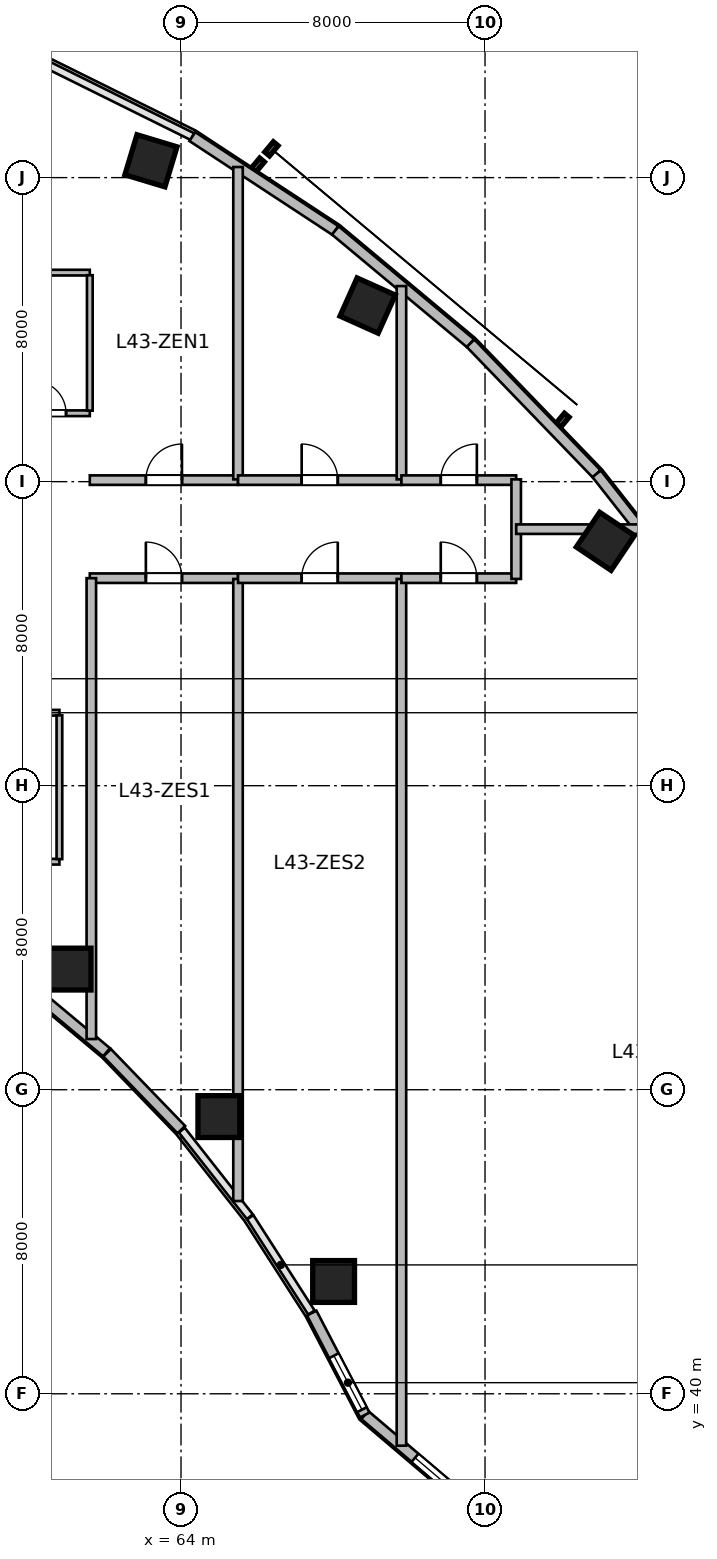
"""IFC4 building model, lengths in metres.
Left out: names, types, materials, properties, quantities, classifications, styles, units other than length and angle.
Written with IfcOpenShell. Run it as: python <this file> out.ifc"""

import sys

from ifc_helpers import new_model, si_unit, direction, frame, frame_2d, origin, origin_2d, place, context, subcontext, project, spatial, rectangle, circle, extrude, source, transform, mapped, element, fill, save


model = new_model("IFC4")
c1 = context("Model", 3, precision=1e-05, world=origin(), true_north=direction((0.0, 1.0)))
c2 = subcontext(c1, "Body", "Model", "MODEL_VIEW")
j1 = project(units=[si_unit("LENGTHUNIT", "METRE"), si_unit("PLANEANGLEUNIT", "RADIAN")], contexts=[c1])
p1 = place(None, origin())
s1 = spatial("IfcSite", under=j1, at=p1, CompositionType="ELEMENT")
p2 = place(p1, origin())
s2 = spatial("IfcBuilding", under=s1, at=p2, CompositionType="ELEMENT")
p3 = place(p2, frame((0.0, 0.0, 177.9)))
s3 = spatial("IfcBuildingStorey", under=s2, at=p3, CompositionType="ELEMENT", Elevation=177.9)
m1 = source(origin(), c2, "Body", "SweptSolid", [
    extrude(rectangle(XDim=1.1, YDim=1.1, at=origin_2d()), origin(), (0.0, 0.0, 1.0), 3.9),
])
p4 = place(p3, frame((63.209, 72.442, 0.0), z_axis=(0.0, 0.0, 1.0), x_axis=(0.288697611798, 0.957420330337, 0.0)))
e1 = element("IfcColumn", 1, at=p4, inside=s3, PredefinedType="COLUMN", context=c2, shape_type="MappedRepresentation", body=[
    mapped(m1, transform((0.0, 0.0, 0.0), scale=1.0)),
])
m2 = source(origin(), c2, "Body", "SweptSolid", [
    extrude(circle(Radius=0.55, at=origin_2d()), origin(), (0.0, 0.0, 1.0), 3.9),
])
p5 = place(p3, frame((61.082, 51.175, 0.0), z_axis=(0.0, 0.0, 1.0), x_axis=(0.409126902895, 0.912477494148, 0.0)))
e2 = element("IfcColumn", 2, at=p5, inside=s3, PredefinedType="COLUMN", context=c2, shape_type="MappedRepresentation", body=[
    mapped(m2, transform((0.0, 0.0, 0.0), scale=1.0)),
])
p6 = place(p3, frame((68.91, 68.633, 0.0), z_axis=(0.0, 0.0, 1.0), x_axis=(0.409126902895, 0.912477494148, 0.0)))
e3 = element("IfcColumn", 3, at=p6, inside=s3, PredefinedType="COLUMN", context=c2, shape_type="MappedRepresentation", body=[
    mapped(m1, transform((0.0, 0.0, 0.0), scale=1.0)),
])
p7 = place(p3, frame((64.996, 47.294, 0.0), z_axis=(0.0, 0.0, 1.0), x_axis=(0.55774510898, 0.830012285095, 0.0)))
e4 = element("IfcColumn", 4, at=p7, inside=s3, PredefinedType="COLUMN", context=c2, shape_type="MappedRepresentation", body=[
    mapped(m2, transform((0.0, 0.0, 0.0), scale=1.0)),
])
p8 = place(p3, frame((75.167, 62.43, 0.0), z_axis=(0.0, 0.0, 1.0), x_axis=(0.55774510898, 0.830012285095, 0.0)))
e5 = element("IfcColumn", 5, at=p8, inside=s3, PredefinedType="COLUMN", context=c2, shape_type="MappedRepresentation", body=[
    mapped(m1, transform((0.0, 0.0, 0.0), scale=1.0)),
])
p9 = place(p3, frame((68.015, 42.955, 0.0), z_axis=(0.0, 0.0, 1.0), x_axis=(0.690756218984, 0.723087716626, 0.0)))
e6 = element("IfcColumn", 6, at=p9, inside=s3, PredefinedType="COLUMN", context=c2, shape_type="MappedRepresentation", body=[
    mapped(m2, transform((0.0, 0.0, 0.0), scale=1.0)),
])
m3 = source(origin(), c2, "Body", "SweptSolid", [
    extrude(rectangle(XDim=4.096, YDim=0.28, at=frame_2d((2.048, 0.0))), origin(), (0.0, 0.0, 1.0), 3.65),
])
p10 = place(p3, frame((71.957, 36.788, 0.0), z_axis=(0.0, 0.0, 1.0), x_axis=(-0.761926081737, 0.647663991564, 0.0)))
e7 = element("IfcWall", 7, at=p10, inside=s3, PredefinedType="SOLIDWALL", context=c2, shape_type="MappedRepresentation", body=[
    mapped(m3, transform((0.0, 0.0, 0.0), scale=1.0)),
])
p11 = place(p10, frame((0.16, 0.0, 0.95)))
e8 = element("IfcOpeningElement", 8, at=p11, cuts=e7, PredefinedType="OPENING", context=c2, shape_type="SweptSolid", body=[
    extrude(rectangle(XDim=2.2, YDim=2.1, at=frame_2d((1.1, 1.05))), frame((0.0, 0.15, 0.0), z_axis=(0.0, -1.0, 0.0), x_axis=(1.0, 0.0, 0.0)), (0.0, 0.0, 1.0), 0.3),
])
m4 = source(origin(), c2, "Body", "SweptSolid", [
    extrude(rectangle(XDim=3.024, YDim=0.28, at=frame_2d((1.512, 0.0))), origin(), (0.0, 0.0, 1.0), 3.65),
])
p12 = place(p3, frame((68.836, 39.44, 0.0), z_axis=(0.0, 0.0, 1.0), x_axis=(-0.461718746531, 0.887026380161, 0.0)))
e9 = element("IfcWall", 9, at=p12, inside=s3, PredefinedType="SOLIDWALL", context=c2, shape_type="MappedRepresentation", body=[
    mapped(m4, transform((0.0, 0.0, 0.0), scale=1.0)),
])
p13 = place(p12, frame((0.16, 0.0, 0.95)))
e10 = element("IfcOpeningElement", 10, at=p13, cuts=e9, PredefinedType="OPENING", context=c2, shape_type="SweptSolid", body=[
    extrude(rectangle(XDim=1.6, YDim=1.9, at=frame_2d((0.8, 0.95))), frame((0.0, 0.15, 0.0), z_axis=(0.0, -1.0, 0.0), x_axis=(1.0, 0.0, 0.0)), (0.0, 0.0, 1.0), 0.3),
])
m5 = source(origin(), c2, "Body", "SweptSolid", [
    extrude(rectangle(XDim=2.812, YDim=0.28, at=frame_2d((1.406, 0.0))), origin(), (0.0, 0.0, 1.0), 3.65),
])
p14 = place(p3, frame((64.008, 46.95, 0.0), z_axis=(0.0, 0.0, 1.0), x_axis=(-0.694583668785, 0.719411931411, 0.0)))
e11 = element("IfcWall", 11, at=p14, inside=s3, PredefinedType="SOLIDWALL", context=c2, shape_type="MappedRepresentation", body=[
    mapped(m5, transform((0.0, 0.0, 0.0), scale=1.0)),
])
m6 = source(origin(), c2, "Body", "SweptSolid", [
    extrude(rectangle(XDim=2.729, YDim=0.28, at=frame_2d((1.365, 0.0))), origin(), (0.0, 0.0, 1.0), 3.65),
])
p15 = place(p3, frame((62.041, 48.987, 0.0), z_axis=(0.0, 0.0, 1.0), x_axis=(-0.767957284255, 0.640501061326, 0.0)))
e12 = element("IfcWall", 12, at=p15, inside=s3, PredefinedType="SOLIDWALL", context=c2, shape_type="MappedRepresentation", body=[
    mapped(m6, transform((0.0, 0.0, 0.0), scale=1.0)),
])
m7 = source(origin(), c2, "Body", "SweptSolid", [
    extrude(rectangle(XDim=4.501, YDim=0.28, at=frame_2d((2.25, 0.0))), origin(), (0.0, 0.0, 1.0), 3.65),
])
p16 = place(p3, frame((64.298, 73.08, 0.0), z_axis=(0.0, 0.0, 1.0), x_axis=(0.835984920737, -0.548752414391, 0.0)))
e13 = element("IfcWall", 13, at=p16, inside=s3, PredefinedType="SOLIDWALL", context=c2, shape_type="MappedRepresentation", body=[
    mapped(m7, transform((0.0, 0.0, 0.0), scale=1.0)),
])
m8 = source(origin(), c2, "Body", "SweptSolid", [
    extrude(rectangle(XDim=4.634, YDim=0.28, at=frame_2d((2.317, 0.0))), origin(), (0.0, 0.0, 1.0), 3.65),
])
p17 = place(p3, frame((68.061, 70.61, 0.0), z_axis=(0.0, 0.0, 1.0), x_axis=(0.767910229096, -0.640557475993, 0.0)))
e14 = element("IfcWall", 14, at=p17, inside=s3, PredefinedType="SOLIDWALL", context=c2, shape_type="MappedRepresentation", body=[
    mapped(m8, transform((0.0, 0.0, 0.0), scale=1.0)),
])
m9 = source(origin(), c2, "Body", "SweptSolid", [
    extrude(rectangle(XDim=4.776, YDim=0.28, at=frame_2d((2.388, 0.0))), origin(), (0.0, 0.0, 1.0), 3.65),
])
p18 = place(p3, frame((71.619, 67.642, 0.0), z_axis=(0.0, 0.0, 1.0), x_axis=(0.694601811851, -0.719394414055, 0.0)))
e15 = element("IfcWall", 15, at=p18, inside=s3, PredefinedType="SOLIDWALL", context=c2, shape_type="MappedRepresentation", body=[
    mapped(m9, transform((0.0, 0.0, 0.0), scale=1.0)),
])
m10 = source(origin(), c2, "Body", "SweptSolid", [
    extrude(rectangle(XDim=4.922, YDim=0.28, at=frame_2d((2.461, 0.0))), origin(), (0.0, 0.0, 1.0), 3.65),
])
p19 = place(p3, frame((74.936, 64.206, 0.0), z_axis=(0.0, 0.0, 1.0), x_axis=(0.61817639101, -0.786039407153, 0.0)))
e16 = element("IfcWall", 16, at=p19, inside=s3, PredefinedType="SOLIDWALL", context=c2, shape_type="MappedRepresentation", body=[
    mapped(m10, transform((0.0, 0.0, 0.0), scale=1.0)),
])
m11 = source(origin(), c2, "Body", "SweptSolid", [
    extrude(rectangle(XDim=2.1, YDim=0.15, at=frame_2d((1.05, 0.0))), origin(), (0.0, 0.0, 1.0), 3.65),
])
p20 = place(p3, frame((59.5, 65.8, 0.0), z_axis=(0.0, 0.0, 1.0), x_axis=(1.0, 0.0, 0.0)))
e17 = element("IfcWall", 17, at=p20, inside=s3, PredefinedType="PARTITIONING", context=c2, shape_type="MappedRepresentation", body=[
    mapped(m11, transform((0.0, 0.0, 0.0), scale=1.0)),
])
p21 = place(p20, frame((0.625, 0.0, 0.0)))
e18 = element("IfcOpeningElement", 18, at=p21, cuts=e17, PredefinedType="OPENING", context=c2, shape_type="SweptSolid", body=[
    extrude(rectangle(XDim=0.85, YDim=2.1, at=frame_2d((0.425, 1.05))), frame((0.0, 0.085, 0.0), z_axis=(0.0, -1.0, 0.0), x_axis=(1.0, 0.0, 0.0)), (0.0, 0.0, 1.0), 0.17),
])
p22 = place(p3, frame((59.5, 69.5, 0.0), z_axis=(0.0, 0.0, 1.0), x_axis=(1.0, 0.0, 0.0)))
e19 = element("IfcWall", 19, at=p22, inside=s3, PredefinedType="PARTITIONING", context=c2, shape_type="MappedRepresentation", body=[
    mapped(m11, transform((0.0, 0.0, 0.0), scale=1.0)),
])
m12 = source(origin(), c2, "Body", "SweptSolid", [
    extrude(rectangle(XDim=3.565, YDim=0.15, at=frame_2d((1.783, 0.0))), origin(), (0.0, 0.0, 1.0), 3.65),
])
p23 = place(p3, frame((61.6, 65.867, 0.0), z_axis=(0.0, 0.0, 1.0), x_axis=(0.0, 1.0, 0.0)))
e20 = element("IfcWall", 20, at=p23, inside=s3, PredefinedType="PARTITIONING", context=c2, shape_type="MappedRepresentation", body=[
    mapped(m12, transform((0.0, 0.0, 0.0), scale=1.0)),
])
m13 = source(origin(), c2, "Body", "SweptSolid", [
    extrude(rectangle(XDim=6.6, YDim=0.15, at=frame_2d((3.3, 0.0))), origin(), (0.0, 0.0, 1.0), 3.095),
])
p24 = place(p3, frame((54.2, 54.0, 0.0), z_axis=(0.0, 0.0, 1.0), x_axis=(1.0, 0.0, 0.0)))
e21 = element("IfcWall", 21, at=p24, inside=s3, PredefinedType="PARTITIONING", context=c2, shape_type="MappedRepresentation", body=[
    mapped(m13, transform((0.0, 0.0, 0.0), scale=1.0)),
])
m14 = source(origin(), c2, "Body", "SweptSolid", [
    extrude(rectangle(XDim=6.6, YDim=0.15, at=frame_2d((3.3, 0.0))), origin(), (0.0, 0.0, 1.0), 3.65),
])
p25 = place(p3, frame((54.2, 57.92, 0.0), z_axis=(0.0, 0.0, 1.0), x_axis=(1.0, 0.0, 0.0)))
e22 = element("IfcWall", 22, at=p25, inside=s3, PredefinedType="PARTITIONING", context=c2, shape_type="MappedRepresentation", body=[
    mapped(m14, transform((0.0, 0.0, 0.0), scale=1.0)),
])
p26 = place(p25, frame((2.825, 0.0, 0.0)))
e23 = element("IfcOpeningElement", 23, at=p26, cuts=e22, PredefinedType="OPENING", context=c2, shape_type="SweptSolid", body=[
    extrude(rectangle(XDim=0.95, YDim=2.1, at=frame_2d((0.475, 1.05))), frame((0.0, 0.085, 0.0), z_axis=(0.0, -1.0, 0.0), x_axis=(1.0, 0.0, 0.0)), (0.0, 0.0, 1.0), 0.17),
])
m15 = source(origin(), c2, "Body", "SweptSolid", [
    extrude(rectangle(XDim=3.785, YDim=0.15, at=frame_2d((1.893, 0.0))), origin(), (0.0, 0.0, 1.0), 3.65),
])
p27 = place(p3, frame((60.8, 54.067, 0.0), z_axis=(0.0, 0.0, 1.0), x_axis=(0.0, 1.0, 0.0)))
e24 = element("IfcWall", 24, at=p27, inside=s3, PredefinedType="PARTITIONING", context=c2, shape_type="MappedRepresentation", body=[
    mapped(m15, transform((0.0, 0.0, 0.0), scale=1.0)),
])
m16 = source(origin(), c2, "Body", "SweptSolid", [
    extrude(rectangle(XDim=3.9, YDim=0.25, at=frame_2d((1.95, 0.0))), origin(), (0.0, 0.0, 1.0), 3.65),
])
p28 = place(p3, frame((61.6, 64.04, 0.0), z_axis=(0.0, 0.0, 1.0), x_axis=(1.0, 0.0, 0.0)))
e25 = element("IfcWall", 25, at=p28, inside=s3, PredefinedType="PARTITIONING", context=c2, shape_type="MappedRepresentation", body=[
    mapped(m16, transform((0.0, 0.0, 0.0), scale=1.0)),
])
p29 = place(p28, frame((1.475, 0.0, 0.0)))
e26 = element("IfcOpeningElement", 26, at=p29, cuts=e25, PredefinedType="OPENING", context=c2, shape_type="SweptSolid", body=[
    extrude(rectangle(XDim=0.95, YDim=2.1, at=frame_2d((0.475, 1.05))), frame((0.0, 0.135, 0.0), z_axis=(0.0, -1.0, 0.0), x_axis=(1.0, 0.0, 0.0)), (0.0, 0.0, 1.0), 0.27),
])
m17 = source(origin(), c2, "Body", "SweptSolid", [
    extrude(rectangle(XDim=8.219, YDim=0.25, at=frame_2d((4.109, 0.0))), origin(), (0.0, 0.0, 1.0), 3.65),
])
p30 = place(p3, frame((65.5, 64.06, 0.0), z_axis=(0.0, 0.0, 1.0), x_axis=(0.0, 1.0, 0.0)))
e27 = element("IfcWall", 27, at=p30, inside=s3, PredefinedType="PARTITIONING", context=c2, shape_type="MappedRepresentation", body=[
    mapped(m17, transform((0.0, 0.0, 0.0), scale=1.0)),
])
m18 = source(origin(), c2, "Body", "SweptSolid", [
    extrude(rectangle(XDim=4.3, YDim=0.25, at=frame_2d((2.15, 0.0))), origin(), (0.0, 0.0, 1.0), 3.65),
])
p31 = place(p3, frame((65.5, 64.04, 0.0), z_axis=(0.0, 0.0, 1.0), x_axis=(1.0, 0.0, 0.0)))
e28 = element("IfcWall", 28, at=p31, inside=s3, PredefinedType="PARTITIONING", context=c2, shape_type="MappedRepresentation", body=[
    mapped(m18, transform((0.0, 0.0, 0.0), scale=1.0)),
])
p32 = place(p31, frame((1.675, 0.0, 0.0)))
e29 = element("IfcOpeningElement", 29, at=p32, cuts=e28, PredefinedType="OPENING", context=c2, shape_type="SweptSolid", body=[
    extrude(rectangle(XDim=0.95, YDim=2.1, at=frame_2d((0.475, 1.05))), frame((0.0, 0.135, 0.0), z_axis=(0.0, -1.0, 0.0), x_axis=(1.0, 0.0, 0.0)), (0.0, 0.0, 1.0), 0.27),
])
m19 = source(origin(), c2, "Body", "SweptSolid", [
    extrude(rectangle(XDim=5.086, YDim=0.25, at=frame_2d((2.543, 0.0))), origin(), (0.0, 0.0, 1.0), 3.65),
])
p33 = place(p3, frame((69.8, 64.06, 0.0), z_axis=(0.0, 0.0, 1.0), x_axis=(0.0, 1.0, 0.0)))
e30 = element("IfcWall", 30, at=p33, inside=s3, PredefinedType="PARTITIONING", context=c2, shape_type="MappedRepresentation", body=[
    mapped(m19, transform((0.0, 0.0, 0.0), scale=1.0)),
])
m20 = source(origin(), c2, "Body", "SweptSolid", [
    extrude(rectangle(XDim=3.02, YDim=0.25, at=frame_2d((1.51, 0.0))), origin(), (0.0, 0.0, 1.0), 3.65),
])
p34 = place(p3, frame((69.8, 64.04, 0.0), z_axis=(0.0, 0.0, 1.0), x_axis=(1.0, 0.0, 0.0)))
e31 = element("IfcWall", 31, at=p34, inside=s3, PredefinedType="PARTITIONING", context=c2, shape_type="MappedRepresentation", body=[
    mapped(m20, transform((0.0, 0.0, 0.0), scale=1.0)),
])
p35 = place(p34, frame((1.035, 0.0, 0.0)))
e32 = element("IfcOpeningElement", 32, at=p35, cuts=e31, PredefinedType="OPENING", context=c2, shape_type="SweptSolid", body=[
    extrude(rectangle(XDim=0.95, YDim=2.1, at=frame_2d((0.475, 1.05))), frame((0.0, 0.135, 0.0), z_axis=(0.0, -1.0, 0.0), x_axis=(1.0, 0.0, 0.0)), (0.0, 0.0, 1.0), 0.27),
])
p36 = place(p3, frame((61.6, 61.46, 0.0), z_axis=(0.0, 0.0, 1.0), x_axis=(1.0, 0.0, 0.0)))
e33 = element("IfcWall", 33, at=p36, inside=s3, PredefinedType="PARTITIONING", context=c2, shape_type="MappedRepresentation", body=[
    mapped(m16, transform((0.0, 0.0, 0.0), scale=1.0)),
])
p37 = place(p36, frame((1.475, 0.0, 0.0)))
e34 = element("IfcOpeningElement", 34, at=p37, cuts=e33, PredefinedType="OPENING", context=c2, shape_type="SweptSolid", body=[
    extrude(rectangle(XDim=0.95, YDim=2.1, at=frame_2d((0.475, 1.05))), frame((0.0, 0.135, 0.0), z_axis=(0.0, -1.0, 0.0), x_axis=(1.0, 0.0, 0.0)), (0.0, 0.0, 1.0), 0.27),
])
m21 = source(origin(), c2, "Body", "SweptSolid", [
    extrude(rectangle(XDim=16.369, YDim=0.25, at=frame_2d((8.185, 0.0))), origin(), (0.0, 0.0, 1.0), 2.942),
])
p38 = place(p3, frame((65.5, 45.071, 0.0), z_axis=(0.0, 0.0, 1.0), x_axis=(0.0, 1.0, 0.0)))
e35 = element("IfcWall", 35, at=p38, inside=s3, PredefinedType="PARTITIONING", context=c2, shape_type="MappedRepresentation", body=[
    mapped(m21, transform((0.0, 0.0, 0.0), scale=1.0)),
])
p39 = place(p3, frame((65.5, 61.46, 0.0), z_axis=(0.0, 0.0, 1.0), x_axis=(1.0, 0.0, 0.0)))
e36 = element("IfcWall", 36, at=p39, inside=s3, PredefinedType="PARTITIONING", context=c2, shape_type="MappedRepresentation", body=[
    mapped(m18, transform((0.0, 0.0, 0.0), scale=1.0)),
])
p40 = place(p39, frame((1.675, 0.0, 0.0)))
e37 = element("IfcOpeningElement", 37, at=p40, cuts=e36, PredefinedType="OPENING", context=c2, shape_type="SweptSolid", body=[
    extrude(rectangle(XDim=0.95, YDim=2.1, at=frame_2d((0.475, 1.05))), frame((0.0, 0.135, 0.0), z_axis=(0.0, -1.0, 0.0), x_axis=(1.0, 0.0, 0.0)), (0.0, 0.0, 1.0), 0.27),
])
m22 = source(origin(), c2, "Body", "SweptSolid", [
    extrude(rectangle(XDim=22.806, YDim=0.25, at=frame_2d((11.403, 0.0))), origin(), (0.0, 0.0, 1.0), 2.942),
])
p41 = place(p3, frame((69.8, 38.634, 0.0), z_axis=(0.0, 0.0, 1.0), x_axis=(0.0, 1.0, 0.0)))
e38 = element("IfcWall", 38, at=p41, inside=s3, PredefinedType="PARTITIONING", context=c2, shape_type="MappedRepresentation", body=[
    mapped(m22, transform((0.0, 0.0, 0.0), scale=1.0)),
])
p42 = place(p3, frame((69.8, 61.46, 0.0), z_axis=(0.0, 0.0, 1.0), x_axis=(1.0, 0.0, 0.0)))
e39 = element("IfcWall", 39, at=p42, inside=s3, PredefinedType="PARTITIONING", context=c2, shape_type="MappedRepresentation", body=[
    mapped(m20, transform((0.0, 0.0, 0.0), scale=1.0)),
])
p43 = place(p42, frame((1.035, 0.0, 0.0)))
e40 = element("IfcOpeningElement", 40, at=p43, cuts=e39, PredefinedType="OPENING", context=c2, shape_type="SweptSolid", body=[
    extrude(rectangle(XDim=0.95, YDim=2.1, at=frame_2d((0.475, 1.05))), frame((0.0, 0.135, 0.0), z_axis=(0.0, -1.0, 0.0), x_axis=(1.0, 0.0, 0.0)), (0.0, 0.0, 1.0), 0.27),
])
m23 = source(origin(), c2, "Body", "SweptSolid", [
    extrude(rectangle(XDim=12.126, YDim=0.25, at=frame_2d((6.063, 0.0))), origin(), (0.0, 0.0, 1.0), 2.942),
])
p44 = place(p3, frame((61.64, 49.334, 0.0), z_axis=(0.0, 0.0, 1.0), x_axis=(0.0, 1.0, 0.0)))
e41 = element("IfcWall", 41, at=p44, inside=s3, PredefinedType="PARTITIONING", context=c2, shape_type="MappedRepresentation", body=[
    mapped(m23, transform((0.0, 0.0, 0.0), scale=1.0)),
])
m24 = source(origin(), c2, "Body", "SweptSolid", [
    extrude(rectangle(XDim=2.62, YDim=0.25, at=frame_2d((1.31, 0.0))), origin(), (0.0, 0.0, 1.0), 3.093),
])
p45 = place(p3, frame((72.82, 61.44, 0.0), z_axis=(0.0, 0.0, 1.0), x_axis=(0.0, 1.0, 0.0)))
e42 = element("IfcWall", 42, at=p45, inside=s3, PredefinedType="PARTITIONING", context=c2, shape_type="MappedRepresentation", body=[
    mapped(m24, transform((0.0, 0.0, 0.0), scale=1.0)),
])
m25 = source(origin(), c2, "Body", "SweptSolid", [
    extrude(rectangle(XDim=3.249, YDim=0.25, at=frame_2d((1.625, 0.0))), origin(), (0.0, 0.0, 1.0), 3.65),
])
p46 = place(p3, frame((72.82, 62.75, 0.0), z_axis=(0.0, 0.0, 1.0), x_axis=(1.0, 0.0, 0.0)))
e43 = element("IfcWall", 43, at=p46, inside=s3, PredefinedType="PARTITIONING", context=c2, shape_type="MappedRepresentation", body=[
    mapped(m25, transform((0.0, 0.0, 0.0), scale=1.0)),
])
m26 = source(origin(), c2, "Body", "SweptSolid", [
    extrude(rectangle(XDim=2.2, YDim=2.1, at=frame_2d((1.1, 1.05))), frame((0.0, 0.03, 0.0), z_axis=(0.0, -1.0, 0.0), x_axis=(1.0, 0.0, 0.0)), (0.0, 0.0, 1.0), 0.06),
])
p47 = place(p11, origin())
e44 = element("IfcWindow", 44, at=p47, inside=s3, PartitioningType="TRIPLE_PANEL_VERTICAL", PredefinedType="WINDOW", context=c2, shape_type="MappedRepresentation", body=[
    mapped(m26, transform((0.0, 0.0, 0.0), scale=1.0)),
])
fill(e8, e44)
m27 = source(origin(), c2, "Body", "SweptSolid", [
    extrude(rectangle(XDim=1.6, YDim=1.9, at=frame_2d((0.8, 0.95))), frame((0.0, 0.03, 0.0), z_axis=(0.0, -1.0, 0.0), x_axis=(1.0, 0.0, 0.0)), (0.0, 0.0, 1.0), 0.06),
])
p48 = place(p13, origin())
e45 = element("IfcWindow", 45, at=p48, inside=s3, PartitioningType="SINGLE_PANEL", PredefinedType="WINDOW", context=c2, shape_type="MappedRepresentation", body=[
    mapped(m27, transform((0.0, 0.0, 0.0), scale=1.0)),
])
fill(e10, e45)
m28 = source(origin(), c2, "Body", "SweptSolid", [
    extrude(rectangle(XDim=0.85, YDim=2.1, at=frame_2d((0.425, 1.05))), frame((0.0, 0.025, 0.0), z_axis=(0.0, -1.0, 0.0), x_axis=(1.0, 0.0, 0.0)), (0.0, 0.0, 1.0), 0.05),
])
p49 = place(p21, origin())
e46 = element("IfcDoor", 46, at=p49, inside=s3, OperationType="SINGLE_SWING_LEFT", PredefinedType="DOOR", context=c2, shape_type="MappedRepresentation", body=[
    mapped(m28, transform((0.0, 0.0, 0.0), scale=1.0)),
])
fill(e18, e46)
m29 = source(origin(), c2, "Body", "SweptSolid", [
    extrude(rectangle(XDim=0.95, YDim=2.1, at=frame_2d((0.475, 1.05))), frame((0.0, 0.025, 0.0), z_axis=(0.0, -1.0, 0.0), x_axis=(1.0, 0.0, 0.0)), (0.0, 0.0, 1.0), 0.05),
])
p50 = place(p29, origin())
e47 = element("IfcDoor", 47, at=p50, inside=s3, OperationType="SINGLE_SWING_RIGHT", PredefinedType="DOOR", context=c2, shape_type="MappedRepresentation", body=[
    mapped(m29, transform((0.0, 0.0, 0.0), scale=1.0)),
])
fill(e26, e47)
p51 = place(p32, origin())
e48 = element("IfcDoor", 48, at=p51, inside=s3, OperationType="SINGLE_SWING_LEFT", PredefinedType="DOOR", context=c2, shape_type="MappedRepresentation", body=[
    mapped(m29, transform((0.0, 0.0, 0.0), scale=1.0)),
])
fill(e29, e48)
p52 = place(p35, origin())
e49 = element("IfcDoor", 49, at=p52, inside=s3, OperationType="SINGLE_SWING_RIGHT", PredefinedType="DOOR", context=c2, shape_type="MappedRepresentation", body=[
    mapped(m29, transform((0.0, 0.0, 0.0), scale=1.0)),
])
fill(e32, e49)
p53 = place(p37, origin())
e50 = element("IfcDoor", 50, at=p53, inside=s3, OperationType="SINGLE_SWING_LEFT", PredefinedType="DOOR", context=c2, shape_type="MappedRepresentation", body=[
    mapped(m29, transform((0.0, 0.0, 0.0), scale=1.0)),
])
fill(e34, e50)
p54 = place(p40, origin())
e51 = element("IfcDoor", 51, at=p54, inside=s3, OperationType="SINGLE_SWING_RIGHT", PredefinedType="DOOR", context=c2, shape_type="MappedRepresentation", body=[
    mapped(m29, transform((0.0, 0.0, 0.0), scale=1.0)),
])
fill(e37, e51)
p55 = place(p43, origin())
e52 = element("IfcDoor", 52, at=p55, inside=s3, OperationType="SINGLE_SWING_LEFT", PredefinedType="DOOR", context=c2, shape_type="MappedRepresentation", body=[
    mapped(m29, transform((0.0, 0.0, 0.0), scale=1.0)),
])
fill(e40, e52)
save(model, sys.argv[1])
